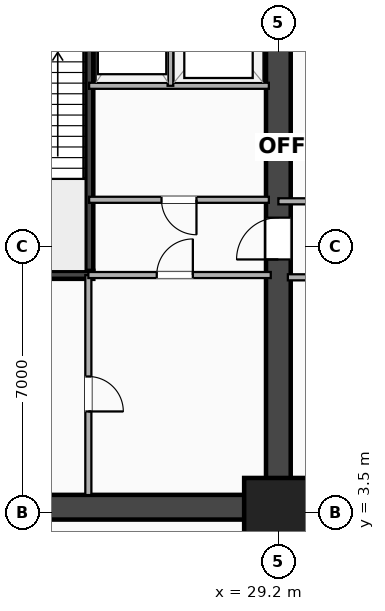
"""IFC4 building model, lengths in metres.
Left out: names, types, materials, properties, quantities, classifications, styles, units other than length and angle.
Written with IfcOpenShell. Run it as: python <this file> out.ifc"""

import sys

from ifc_helpers import new_model, si_unit, direction, frame, frame_2d, origin, origin_2d, place, context, subcontext, project, spatial, rectangle, extrude, element, fill, save


model = new_model("IFC4")
c1 = context("Model", 3, precision=1e-05, world=origin(), true_north=direction((0.0, 1.0)))
c2 = subcontext(c1, "Body", "Model", "MODEL_VIEW")
j1 = project(units=[si_unit("LENGTHUNIT", "METRE"), si_unit("PLANEANGLEUNIT", "RADIAN")], contexts=[c1])
p1 = place(None, origin())
s1 = spatial("IfcSite", under=j1, at=p1, CompositionType="ELEMENT")
p2 = place(p1, origin())
s2 = spatial("IfcBuilding", under=s1, at=p2, CompositionType="ELEMENT")
p3 = place(p2, frame((0.0, 0.0, -5.4)))
s3 = spatial("IfcBuildingStorey", under=s2, at=p3, CompositionType="ELEMENT", Elevation=-5.4)
p4 = place(p3, frame((20.3, 3.63, 0.0), z_axis=(0.0, 0.0, 1.0), x_axis=(1.0, 0.0, 0.0)))
e1 = element("IfcWall", 1, at=p4, inside=s3, PredefinedType="SHEAR", context=c2, shape_type="SweptSolid", body=[
    extrude(rectangle(XDim=24.5, YDim=0.65, at=frame_2d((12.25, 0.0))), origin(), (0.0, 0.0, 1.0), 5.05),
])
p5 = place(p3, frame((29.2, 3.5, 0.0), z_axis=(0.0, 0.0, 1.0), x_axis=(0.0, 1.0, 0.0)))
e2 = element("IfcWall", 2, at=p5, inside=s3, PredefinedType="SHEAR", context=c2, shape_type="SweptSolid", body=[
    extrude(rectangle(XDim=16.9, YDim=0.65, at=frame_2d((8.45, 0.0))), origin(), (0.0, 0.0, 1.0), 5.05),
])
p6 = place(p5, frame((7.75, 0.0, 0.0), z_axis=(0.0, 0.0, 1.0), x_axis=(-1.0, 0.0, 0.0)))
e3 = element("IfcOpeningElement", 3, at=p6, cuts=e2, PredefinedType="OPENING", context=c2, shape_type="SweptSolid", body=[
    extrude(rectangle(XDim=1.1, YDim=2.15, at=frame_2d((0.55, 1.075))), frame((0.0, 0.335, 0.0), z_axis=(0.0, -1.0, 0.0), x_axis=(1.0, 0.0, 0.0)), (0.0, 0.0, 1.0), 0.67),
])
p7 = place(p3, frame((24.225, 9.745, 0.0), z_axis=(0.0, 0.0, 1.0), x_axis=(0.0, 1.0, 0.0)))
e4 = element("IfcWall", 4, at=p7, inside=s3, PredefinedType="SHEAR", context=c2, shape_type="SweptSolid", body=[
    extrude(rectangle(XDim=8.01, YDim=0.21, at=frame_2d((4.005, 0.0))), origin(), (0.0, 0.0, 1.0), 5.05),
])
p8 = place(p3, frame((20.67, 9.745, 0.0), z_axis=(0.0, 0.0, 1.0), x_axis=(1.0, 0.0, 0.0)))
e5 = element("IfcWall", 5, at=p8, inside=s3, PredefinedType="SHEAR", context=c2, shape_type="SweptSolid", body=[
    extrude(rectangle(XDim=3.66, YDim=0.21, at=frame_2d((1.83, 0.0))), origin(), (0.0, 0.0, 1.0), 5.05),
])
p9 = place(p3, frame((29.2, 3.5, 0.0), z_axis=(0.0, 0.0, 1.0), x_axis=(1.0, 0.0, 0.0)))
e6 = element("IfcColumn", 6, at=p9, inside=s3, PredefinedType="COLUMN", context=c2, shape_type="SweptSolid", body=[
    extrude(rectangle(XDim=1.8, YDim=1.8, at=origin_2d()), origin(), (0.0, 0.0, 1.0), 5.05),
])
p10 = place(p3, frame((24.22, 14.72, 0.0), z_axis=(0.0, 0.0, 1.0), x_axis=(1.0, 0.0, 0.0)))
e7 = element("IfcWall", 7, at=p10, inside=s3, PredefinedType="PARTITIONING", context=c2, shape_type="SweptSolid", body=[
    extrude(rectangle(XDim=4.73, YDim=0.16, at=frame_2d((2.365, 0.0))), origin(), (0.0, 0.0, 1.0), 4.18),
])
p11 = place(p3, frame((26.36, 14.72, 0.0), z_axis=(0.0, 0.0, 1.0), x_axis=(0.0, 1.0, 0.0)))
e8 = element("IfcWall", 8, at=p11, inside=s3, PredefinedType="PARTITIONING", context=c2, shape_type="SweptSolid", body=[
    extrude(rectangle(XDim=3.04, YDim=0.15, at=frame_2d((1.52, 0.0))), origin(), (0.0, 0.0, 1.0), 5.05),
])
p12 = place(p3, frame((24.22, 11.72, 0.0), z_axis=(0.0, 0.0, 1.0), x_axis=(1.0, 0.0, 0.0)))
e9 = element("IfcWall", 9, at=p12, inside=s3, PredefinedType="PARTITIONING", context=c2, shape_type="SweptSolid", body=[
    extrude(rectangle(XDim=4.73, YDim=0.16, at=frame_2d((2.365, 0.0))), origin(), (0.0, 0.0, 1.0), 4.18),
])
p13 = place(p12, frame((1.905, 0.0, 0.0)))
e10 = element("IfcOpeningElement", 10, at=p13, cuts=e9, PredefinedType="OPENING", context=c2, shape_type="SweptSolid", body=[
    extrude(rectangle(XDim=0.92, YDim=2.08, at=frame_2d((0.46, 1.04))), frame((0.0, 0.09, 0.0), z_axis=(0.0, -1.0, 0.0), x_axis=(1.0, 0.0, 0.0)), (0.0, 0.0, 1.0), 0.18),
])
p14 = place(p3, frame((24.2, 3.95, 0.0), z_axis=(0.0, 0.0, 1.0), x_axis=(0.0, 1.0, 0.0)))
e11 = element("IfcWall", 11, at=p14, inside=s3, PredefinedType="PARTITIONING", context=c2, shape_type="SweptSolid", body=[
    extrude(rectangle(XDim=5.79, YDim=0.16, at=frame_2d((2.895, 0.0))), origin(), (0.0, 0.0, 1.0), 4.114),
])
p15 = place(p14, frame((2.2, 0.0, 0.0)))
e12 = element("IfcOpeningElement", 12, at=p15, cuts=e11, PredefinedType="OPENING", context=c2, shape_type="SweptSolid", body=[
    extrude(rectangle(XDim=0.92, YDim=2.08, at=frame_2d((0.46, 1.04))), frame((0.0, 0.09, 0.0), z_axis=(0.0, -1.0, 0.0), x_axis=(1.0, 0.0, 0.0)), (0.0, 0.0, 1.0), 0.18),
])
p16 = place(p3, frame((24.2, 9.74, 0.0), z_axis=(0.0, 0.0, 1.0), x_axis=(1.0, 0.0, 0.0)))
e13 = element("IfcWall", 13, at=p16, inside=s3, PredefinedType="PARTITIONING", context=c2, shape_type="SweptSolid", body=[
    extrude(rectangle(XDim=4.8, YDim=0.16, at=frame_2d((2.4, 0.0))), origin(), (0.0, 0.0, 1.0), 4.18),
])
p17 = place(p16, frame((2.75, 0.0, 0.0), z_axis=(0.0, 0.0, 1.0), x_axis=(-1.0, 0.0, 0.0)))
e14 = element("IfcOpeningElement", 14, at=p17, cuts=e13, PredefinedType="OPENING", context=c2, shape_type="SweptSolid", body=[
    extrude(rectangle(XDim=0.95, YDim=2.15, at=frame_2d((0.475, 1.075))), frame((0.0, 0.09, 0.0), z_axis=(0.0, -1.0, 0.0), x_axis=(1.0, 0.0, 0.0)), (0.0, 0.0, 1.0), 0.18),
])
p18 = place(p3, frame((29.45, 9.68, 0.0), z_axis=(0.0, 0.0, 1.0), x_axis=(1.0, 0.0, 0.0)))
e15 = element("IfcWall", 15, at=p18, inside=s3, PredefinedType="PARTITIONING", context=c2, shape_type="SweptSolid", body=[
    extrude(rectangle(XDim=7.3, YDim=0.16, at=frame_2d((3.65, 0.0))), origin(), (0.0, 0.0, 1.0), 4.18),
])
p19 = place(p18, frame((4.11, 0.0, 0.0), z_axis=(0.0, 0.0, 1.0), x_axis=(-1.0, 0.0, 0.0)))
e16 = element("IfcOpeningElement", 16, at=p19, cuts=e15, PredefinedType="OPENING", context=c2, shape_type="SweptSolid", body=[
    extrude(rectangle(XDim=0.92, YDim=2.08, at=frame_2d((0.46, 1.04))), frame((0.0, 0.09, 0.0), z_axis=(0.0, -1.0, 0.0), x_axis=(1.0, 0.0, 0.0)), (0.0, 0.0, 1.0), 0.18),
])
p20 = place(p3, frame((29.2, 11.68, 0.0), z_axis=(0.0, 0.0, 1.0), x_axis=(1.0, 0.0, 0.0)))
e17 = element("IfcWall", 17, at=p20, inside=s3, PredefinedType="PARTITIONING", context=c2, shape_type="SweptSolid", body=[
    extrude(rectangle(XDim=5.72, YDim=0.16, at=frame_2d((2.86, 0.0))), origin(), (0.0, 0.0, 1.0), 4.18),
])
p21 = place(p6, origin())
e18 = element("IfcDoor", 18, at=p21, inside=s3, OperationType="SINGLE_SWING_LEFT", PredefinedType="DOOR", context=c2, shape_type="SweptSolid", body=[
    extrude(rectangle(XDim=1.1, YDim=2.15, at=frame_2d((0.55, 1.075))), frame((0.0, 0.025, 0.0), z_axis=(0.0, -1.0, 0.0), x_axis=(1.0, 0.0, 0.0)), (0.0, 0.0, 1.0), 0.05),
])
fill(e3, e18)
p22 = place(p13, origin())
e19 = element("IfcDoor", 19, at=p22, inside=s3, OperationType="SINGLE_SWING_RIGHT", PredefinedType="DOOR", context=c2, shape_type="SweptSolid", body=[
    extrude(rectangle(XDim=0.92, YDim=2.08, at=frame_2d((0.46, 1.04))), frame((0.0, 0.025, 0.0), z_axis=(0.0, -1.0, 0.0), x_axis=(1.0, 0.0, 0.0)), (0.0, 0.0, 1.0), 0.05),
])
fill(e10, e19)
p23 = place(p15, origin())
e20 = element("IfcDoor", 20, at=p23, inside=s3, OperationType="SINGLE_SWING_LEFT", PredefinedType="DOOR", context=c2, shape_type="SweptSolid", body=[
    extrude(rectangle(XDim=0.92, YDim=2.08, at=frame_2d((0.46, 1.04))), frame((0.0, 0.025, 0.0), z_axis=(0.0, -1.0, 0.0), x_axis=(1.0, 0.0, 0.0)), (0.0, 0.0, 1.0), 0.05),
])
fill(e12, e20)
p24 = place(p17, origin())
e21 = element("IfcDoor", 21, at=p24, inside=s3, OperationType="SINGLE_SWING_RIGHT", PredefinedType="DOOR", context=c2, shape_type="SweptSolid", body=[
    extrude(rectangle(XDim=0.95, YDim=2.15, at=frame_2d((0.475, 1.075))), frame((0.0, 0.025, 0.0), z_axis=(0.0, -1.0, 0.0), x_axis=(1.0, 0.0, 0.0)), (0.0, 0.0, 1.0), 0.05),
])
fill(e14, e21)
save(model, sys.argv[1])
